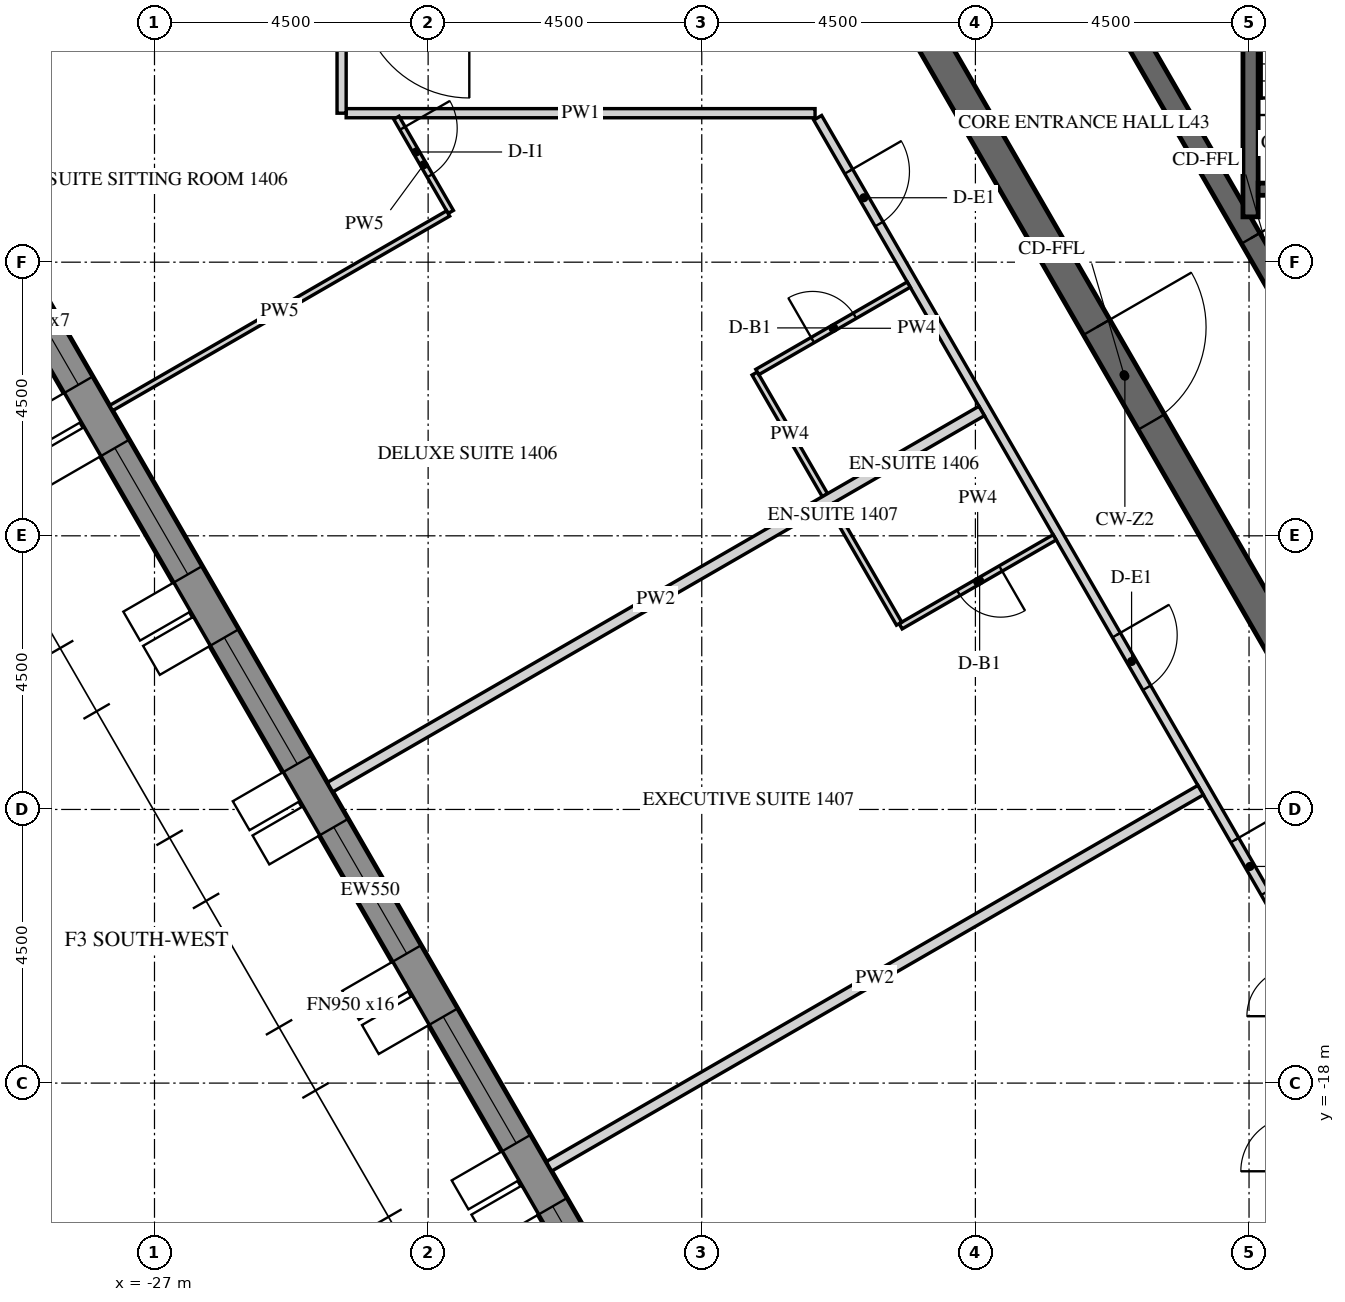
"""IFC4 building model, lengths in metres.
Left out: names, types, materials, properties, quantities, classifications, styles, units other than length and angle.
Written with IfcOpenShell. Run it as: python <this file> out.ifc"""

import sys

from ifc_helpers import new_model, si_unit, direction, frame, frame_2d, origin, place, context, subcontext, project, spatial, polyline, rectangle, outline, extrude, element, fill, save


model = new_model("IFC4")
c1 = context("Model", 3, precision=1e-05, world=origin(), true_north=direction((0.0, 1.0)))
c2 = subcontext(c1, "Body", "Model", "MODEL_VIEW")
j1 = project(units=[si_unit("LENGTHUNIT", "METRE"), si_unit("PLANEANGLEUNIT", "RADIAN")], contexts=[c1])
p1 = place(None, origin())
s1 = spatial("IfcSite", under=j1, at=p1, CompositionType="ELEMENT")
p2 = place(p1, origin())
s2 = spatial("IfcBuilding", under=s1, at=p2, CompositionType="ELEMENT")
p3 = place(p2, frame((0.0, 0.0, 183.9)))
s3 = spatial("IfcBuildingStorey", under=s2, at=p3, CompositionType="ELEMENT", Elevation=183.9)
p4 = place(p3, frame((-30.391, -2.811, -0.15), z_axis=(0.0, 0.0, 1.0), x_axis=(0.499998569178, -0.866026229868, 0.0)))
e1 = element("IfcWall", 1, at=p4, inside=s3, PredefinedType="SOLIDWALL", context=c2, shape_type="SweptSolid", body=[
    extrude(outline(polyline([(-0.022, -0.275), (27.783, -0.275), (27.732, 0.275), (0.022, 0.275), (-0.022, -0.275)])), origin(), (0.0, 0.0, 1.0), 3.9),
])
p5 = place(p4, frame((1.879, 0.0, 1.05)))
e2 = element("IfcOpeningElement", 2, at=p5, cuts=e1, PredefinedType="OPENING", context=c2, shape_type="SweptSolid", body=[
    extrude(rectangle(XDim=2.4, YDim=2.4, at=frame_2d((1.2, 1.2))), frame((0.0, 0.285, 0.0), z_axis=(0.0, -1.0, 0.0), x_axis=(1.0, 0.0, 0.0)), (0.0, 0.0, 1.0), 0.57),
])
p6 = place(p4, frame((5.479, 0.0, 1.05)))
e3 = element("IfcOpeningElement", 3, at=p6, cuts=e1, PredefinedType="OPENING", context=c2, shape_type="SweptSolid", body=[
    extrude(rectangle(XDim=2.4, YDim=2.4, at=frame_2d((1.2, 1.2))), frame((0.0, 0.285, 0.0), z_axis=(0.0, -1.0, 0.0), x_axis=(1.0, 0.0, 0.0)), (0.0, 0.0, 1.0), 0.57),
])
p7 = place(p4, frame((9.079, 0.0, 1.05)))
e4 = element("IfcOpeningElement", 4, at=p7, cuts=e1, PredefinedType="OPENING", context=c2, shape_type="SweptSolid", body=[
    extrude(rectangle(XDim=2.4, YDim=2.4, at=frame_2d((1.2, 1.2))), frame((0.0, 0.285, 0.0), z_axis=(0.0, -1.0, 0.0), x_axis=(1.0, 0.0, 0.0)), (0.0, 0.0, 1.0), 0.57),
])
p8 = place(p4, frame((12.679, 0.0, 1.05)))
e5 = element("IfcOpeningElement", 5, at=p8, cuts=e1, PredefinedType="OPENING", context=c2, shape_type="SweptSolid", body=[
    extrude(rectangle(XDim=2.4, YDim=2.4, at=frame_2d((1.2, 1.2))), frame((0.0, 0.285, 0.0), z_axis=(0.0, -1.0, 0.0), x_axis=(1.0, 0.0, 0.0)), (0.0, 0.0, 1.0), 0.57),
])
p9 = place(p4, frame((16.279, 0.0, 1.05)))
e6 = element("IfcOpeningElement", 6, at=p9, cuts=e1, PredefinedType="OPENING", context=c2, shape_type="SweptSolid", body=[
    extrude(rectangle(XDim=2.4, YDim=2.4, at=frame_2d((1.2, 1.2))), frame((0.0, 0.285, 0.0), z_axis=(0.0, -1.0, 0.0), x_axis=(1.0, 0.0, 0.0)), (0.0, 0.0, 1.0), 0.57),
])
p10 = place(p4, frame((19.879, 0.0, 1.05)))
e7 = element("IfcOpeningElement", 7, at=p10, cuts=e1, PredefinedType="OPENING", context=c2, shape_type="SweptSolid", body=[
    extrude(rectangle(XDim=2.4, YDim=2.4, at=frame_2d((1.2, 1.2))), frame((0.0, 0.285, 0.0), z_axis=(0.0, -1.0, 0.0), x_axis=(1.0, 0.0, 0.0)), (0.0, 0.0, 1.0), 0.57),
])
p11 = place(p4, frame((23.479, 0.0, 1.05)))
e8 = element("IfcOpeningElement", 8, at=p11, cuts=e1, PredefinedType="OPENING", context=c2, shape_type="SweptSolid", body=[
    extrude(rectangle(XDim=2.4, YDim=2.4, at=frame_2d((1.2, 1.2))), frame((0.0, 0.285, 0.0), z_axis=(0.0, -1.0, 0.0), x_axis=(1.0, 0.0, 0.0)), (0.0, 0.0, 1.0), 0.57),
])
p12 = place(p3, frame((-14.722, 0.0, -0.15), z_axis=(0.0, 0.0, 1.0), x_axis=(0.50000571537, -0.866022103989, 0.0)))
e9 = element("IfcWall", 9, at=p12, inside=s3, PredefinedType="SHEAR", context=c2, shape_type="SweptSolid", body=[
    extrude(outline(polyline([(-0.144, -0.25), (14.867, -0.25), (14.578, 0.25), (0.144, 0.25), (-0.144, -0.25)])), origin(), (0.0, 0.0, 1.0), 3.9),
])
p13 = place(p12, frame((6.432, 0.0, 0.15)))
e10 = element("IfcOpeningElement", 10, at=p13, cuts=e9, PredefinedType="OPENING", context=c2, shape_type="SweptSolid", body=[
    extrude(rectangle(XDim=1.8, YDim=2.4, at=frame_2d((0.9, 1.2))), frame((0.0, 0.26, 0.0), z_axis=(0.0, -1.0, 0.0), x_axis=(1.0, 0.0, 0.0)), (0.0, 0.0, 1.0), 0.52),
])
p14 = place(p3, frame((-11.345, 0.0, -0.15), z_axis=(0.0, 0.0, 1.0), x_axis=(0.499995046907, -0.866028263435, 0.0)))
e11 = element("IfcWall", 11, at=p14, inside=s3, PredefinedType="SHEAR", context=c2, shape_type="SweptSolid", body=[
    extrude(outline(polyline([(-0.101, -0.175), (11.446, -0.175), (11.244, 0.175), (0.101, 0.175), (-0.101, -0.175)])), origin(), (0.0, 0.0, 1.0), 3.9),
])
p15 = place(p14, frame((4.744, 0.0, 0.15)))
e12 = element("IfcOpeningElement", 12, at=p15, cuts=e11, PredefinedType="OPENING", context=c2, shape_type="SweptSolid", body=[
    extrude(rectangle(XDim=1.8, YDim=2.4, at=frame_2d((0.9, 1.2))), frame((0.0, 0.185, 0.0), z_axis=(0.0, -1.0, 0.0), x_axis=(1.0, 0.0, 0.0)), (0.0, 0.0, 1.0), 0.37),
])
p16 = place(p3, frame((-8.975, -3.755, -0.25), z_axis=(0.0, 0.0, 1.0), x_axis=(0.0, 1.0, 0.0)))
e13 = element("IfcWall", 13, at=p16, inside=s3, PredefinedType="SHEAR", context=c2, shape_type="SweptSolid", body=[
    extrude(rectangle(XDim=7.51, YDim=0.25, at=frame_2d((3.755, 0.0))), origin(), (0.0, 0.0, 1.0), 3.9),
])
p17 = place(p3, frame((-8.85, -3.3, -0.25), z_axis=(0.0, 0.0, 1.0), x_axis=(1.0, 0.0, 0.0)))
e14 = element("IfcWall", 14, at=p17, inside=s3, PredefinedType="SHEAR", context=c2, shape_type="SweptSolid", body=[
    extrude(rectangle(XDim=2.95, YDim=0.2, at=frame_2d((1.475, 0.0))), origin(), (0.0, 0.0, 1.0), 3.9),
])
p18 = place(p17, frame((0.875, 0.0, 0.25)))
e15 = element("IfcOpeningElement", 15, at=p18, cuts=e14, PredefinedType="OPENING", context=c2, shape_type="SweptSolid", body=[
    extrude(rectangle(XDim=1.2, YDim=2.4, at=frame_2d((0.6, 1.2))), frame((0.0, 0.11, 0.0), z_axis=(0.0, -1.0, 0.0), x_axis=(1.0, 0.0, 0.0)), (0.0, 0.0, 1.0), 0.22),
])
p19 = place(p3, frame((-23.848, -2.05, 0.0), z_axis=(0.0, 0.0, 1.0), x_axis=(1.0, 0.0, 0.0)))
e16 = element("IfcWall", 16, at=p19, inside=s3, PredefinedType="PARTITIONING", context=c2, shape_type="SweptSolid", body=[
    extrude(rectangle(XDim=7.711, YDim=0.15, at=frame_2d((3.855, 0.0))), origin(), (0.0, 0.0, 1.0), 2.988),
])
p20 = place(p3, frame((-16.094, -2.125, 0.0), z_axis=(0.0, 0.0, 1.0), x_axis=(0.500010545262, -0.866019315389, 0.0)))
e17 = element("IfcWall", 17, at=p20, inside=s3, PredefinedType="PARTITIONING", context=c2, shape_type="SweptSolid", body=[
    extrude(rectangle(XDim=14.867, YDim=0.15, at=frame_2d((7.434, 0.0))), origin(), (0.0, 0.0, 1.0), 2.988),
])
p21 = place(p20, frame((1.019, 0.0, 0.0)))
e18 = element("IfcOpeningElement", 18, at=p21, cuts=e17, PredefinedType="OPENING", context=c2, shape_type="SweptSolid", body=[
    extrude(rectangle(XDim=1.0, YDim=2.1, at=frame_2d((0.5, 1.05))), frame((0.0, 0.085, 0.0), z_axis=(0.0, -1.0, 0.0), x_axis=(1.0, 0.0, 0.0)), (0.0, 0.0, 1.0), 0.17),
])
p22 = place(p20, frame((9.824, 0.0, 0.0)))
e19 = element("IfcOpeningElement", 19, at=p22, cuts=e17, PredefinedType="OPENING", context=c2, shape_type="SweptSolid", body=[
    extrude(rectangle(XDim=1.0, YDim=2.1, at=frame_2d((0.5, 1.05))), frame((0.0, 0.085, 0.0), z_axis=(0.0, -1.0, 0.0), x_axis=(1.0, 0.0, 0.0)), (0.0, 0.0, 1.0), 0.17),
])
p23 = place(p20, frame((13.717, 0.0, 0.0)))
e20 = element("IfcOpeningElement", 20, at=p23, cuts=e17, PredefinedType="OPENING", context=c2, shape_type="SweptSolid", body=[
    extrude(rectangle(XDim=1.0, YDim=2.1, at=frame_2d((0.5, 1.05))), frame((0.0, 0.085, 0.0), z_axis=(0.0, -1.0, 0.0), x_axis=(1.0, 0.0, 0.0)), (0.0, 0.0, 1.0), 0.17),
])
p24 = place(p3, frame((-23.923, -0.564, 0.0), z_axis=(0.0, 0.0, 1.0), x_axis=(0.0, -1.0, 0.0)))
e21 = element("IfcWall", 21, at=p24, inside=s3, PredefinedType="PARTITIONING", context=c2, shape_type="SweptSolid", body=[
    extrude(rectangle(XDim=1.486, YDim=0.15, at=frame_2d((0.743, 0.0))), origin(), (0.0, 0.0, 1.0), 2.988),
])
p25 = place(p3, frame((-15.975, -8.331, 0.0), z_axis=(0.0, 0.0, 1.0), x_axis=(-0.500015210774, 0.866016621662, 0.0)))
e22 = element("IfcWall", 22, at=p25, inside=s3, PredefinedType="PARTITIONING", context=c2, shape_type="SweptSolid", body=[
    extrude(rectangle(XDim=2.31, YDim=0.1, at=frame_2d((1.155, 0.0))), origin(), (0.0, 0.0, 1.0), 2.988),
])
p26 = place(p3, frame((-17.086, -6.306, 0.0), z_axis=(0.0, 0.0, 1.0), x_axis=(0.866018712932, 0.500011588718, 0.0)))
e23 = element("IfcWall", 23, at=p26, inside=s3, PredefinedType="PARTITIONING", context=c2, shape_type="SweptSolid", body=[
    extrude(rectangle(XDim=2.875, YDim=0.1, at=frame_2d((1.438, 0.0))), origin(), (0.0, 0.0, 1.0), 2.988),
])
p27 = place(p26, frame((1.05, 0.0, 0.0)))
e24 = element("IfcOpeningElement", 24, at=p27, cuts=e23, PredefinedType="OPENING", context=c2, shape_type="SweptSolid", body=[
    extrude(rectangle(XDim=0.8, YDim=2.1, at=frame_2d((0.4, 1.05))), frame((0.0, 0.06, 0.0), z_axis=(0.0, -1.0, 0.0), x_axis=(1.0, 0.0, 0.0)), (0.0, 0.0, 1.0), 0.12),
])
p28 = place(p3, frame((-23.022, -2.125, 0.0), z_axis=(0.0, 0.0, 1.0), x_axis=(0.499927291608, -0.866067377925, 0.0)))
e25 = element("IfcWall", 25, at=p28, inside=s3, PredefinedType="PARTITIONING", context=c2, shape_type="SweptSolid", body=[
    extrude(rectangle(XDim=1.788, YDim=0.1, at=frame_2d((0.894, 0.0))), origin(), (0.0, 0.0, 1.0), 2.988),
])
p29 = place(p28, frame((0.2, 0.0, 0.0)))
e26 = element("IfcOpeningElement", 26, at=p29, cuts=e25, PredefinedType="OPENING", context=c2, shape_type="SweptSolid", body=[
    extrude(rectangle(XDim=0.9, YDim=2.1, at=frame_2d((0.45, 1.05))), frame((0.0, 0.06, 0.0), z_axis=(0.0, -1.0, 0.0), x_axis=(1.0, 0.0, 0.0)), (0.0, 0.0, 1.0), 0.12),
])
p30 = place(p3, frame((-22.171, -3.699, 0.0), z_axis=(0.0, 0.0, 1.0), x_axis=(-0.866025499775, -0.499999833739, 0.0)))
e27 = element("IfcWall", 27, at=p30, inside=s3, PredefinedType="PARTITIONING", context=c2, shape_type="SweptSolid", body=[
    extrude(rectangle(XDim=6.4, YDim=0.1, at=frame_2d((3.2, 0.0))), origin(), (0.0, 0.0, 1.0), 2.988),
])
p31 = place(p3, frame((-24.114, -13.134, 0.0), z_axis=(0.0, 0.0, 1.0), x_axis=(0.866024931941, 0.500000817256, 0.0)))
e28 = element("IfcWall", 28, at=p31, inside=s3, PredefinedType="PARTITIONING", context=c2, shape_type="SweptSolid", body=[
    extrude(rectangle(XDim=12.375, YDim=0.18, at=frame_2d((6.188, 0.0))), origin(), (0.0, 0.0, 1.0), 2.988),
])
p32 = place(p3, frame((-12.196, -9.025, 0.0), z_axis=(0.0, 0.0, 1.0), x_axis=(-0.86601045545, -0.500025890382, 0.0)))
e29 = element("IfcWall", 29, at=p32, inside=s3, PredefinedType="PARTITIONING", context=c2, shape_type="SweptSolid", body=[
    extrude(rectangle(XDim=2.925, YDim=0.1, at=frame_2d((1.462, 0.0))), origin(), (0.0, 0.0, 1.0), 2.988),
])
p33 = place(p32, frame((1.025, 0.0, 0.0)))
e30 = element("IfcOpeningElement", 30, at=p33, cuts=e29, PredefinedType="OPENING", context=c2, shape_type="SweptSolid", body=[
    extrude(rectangle(XDim=0.8, YDim=2.1, at=frame_2d((0.4, 1.05))), frame((0.0, 0.06, 0.0), z_axis=(0.0, -1.0, 0.0), x_axis=(1.0, 0.0, 0.0)), (0.0, 0.0, 1.0), 0.12),
])
p34 = place(p3, frame((-14.755, -10.444, 0.0), z_axis=(0.0, 0.0, 1.0), x_axis=(-0.4999967785, 0.866027263711, 0.0)))
e31 = element("IfcWall", 31, at=p34, inside=s3, PredefinedType="PARTITIONING", context=c2, shape_type="SweptSolid", body=[
    extrude(rectangle(XDim=2.26, YDim=0.1, at=frame_2d((1.13, 0.0))), origin(), (0.0, 0.0, 1.0), 2.988),
])
p35 = place(p3, frame((-20.513, -19.37, 0.0), z_axis=(0.0, 0.0, 1.0), x_axis=(0.866024931941, 0.500000817256, 0.0)))
e32 = element("IfcWall", 32, at=p35, inside=s3, PredefinedType="PARTITIONING", context=c2, shape_type="SweptSolid", body=[
    extrude(rectangle(XDim=12.375, YDim=0.18, at=frame_2d((6.188, 0.0))), origin(), (0.0, 0.0, 1.0), 2.988),
])
p36 = place(p5, frame((0.0, 0.205, 0.0)))
e33 = element("IfcWindow", 33, at=p36, inside=s3, PartitioningType="DOUBLE_PANEL_VERTICAL", PredefinedType="WINDOW", context=c2, shape_type="SweptSolid", body=[
    extrude(rectangle(XDim=2.4, YDim=2.4, at=frame_2d((1.2, 1.2))), frame((0.0, 0.03, 0.0), z_axis=(0.0, -1.0, 0.0), x_axis=(1.0, 0.0, 0.0)), (0.0, 0.0, 1.0), 0.06),
])
fill(e2, e33)
p37 = place(p6, frame((0.0, 0.205, 0.0)))
e34 = element("IfcWindow", 34, at=p37, inside=s3, PartitioningType="DOUBLE_PANEL_VERTICAL", PredefinedType="WINDOW", context=c2, shape_type="SweptSolid", body=[
    extrude(rectangle(XDim=2.4, YDim=2.4, at=frame_2d((1.2, 1.2))), frame((0.0, 0.03, 0.0), z_axis=(0.0, -1.0, 0.0), x_axis=(1.0, 0.0, 0.0)), (0.0, 0.0, 1.0), 0.06),
])
fill(e3, e34)
p38 = place(p7, frame((0.0, 0.205, 0.0)))
e35 = element("IfcWindow", 35, at=p38, inside=s3, PartitioningType="DOUBLE_PANEL_VERTICAL", PredefinedType="WINDOW", context=c2, shape_type="SweptSolid", body=[
    extrude(rectangle(XDim=2.4, YDim=2.4, at=frame_2d((1.2, 1.2))), frame((0.0, 0.03, 0.0), z_axis=(0.0, -1.0, 0.0), x_axis=(1.0, 0.0, 0.0)), (0.0, 0.0, 1.0), 0.06),
])
fill(e4, e35)
p39 = place(p8, frame((0.0, 0.205, 0.0)))
e36 = element("IfcWindow", 36, at=p39, inside=s3, PartitioningType="DOUBLE_PANEL_VERTICAL", PredefinedType="WINDOW", context=c2, shape_type="SweptSolid", body=[
    extrude(rectangle(XDim=2.4, YDim=2.4, at=frame_2d((1.2, 1.2))), frame((0.0, 0.03, 0.0), z_axis=(0.0, -1.0, 0.0), x_axis=(1.0, 0.0, 0.0)), (0.0, 0.0, 1.0), 0.06),
])
fill(e5, e36)
p40 = place(p9, frame((0.0, 0.205, 0.0)))
e37 = element("IfcWindow", 37, at=p40, inside=s3, PartitioningType="DOUBLE_PANEL_VERTICAL", PredefinedType="WINDOW", context=c2, shape_type="SweptSolid", body=[
    extrude(rectangle(XDim=2.4, YDim=2.4, at=frame_2d((1.2, 1.2))), frame((0.0, 0.03, 0.0), z_axis=(0.0, -1.0, 0.0), x_axis=(1.0, 0.0, 0.0)), (0.0, 0.0, 1.0), 0.06),
])
fill(e6, e37)
p41 = place(p10, frame((0.0, 0.205, 0.0)))
e38 = element("IfcWindow", 38, at=p41, inside=s3, PartitioningType="DOUBLE_PANEL_VERTICAL", PredefinedType="WINDOW", context=c2, shape_type="SweptSolid", body=[
    extrude(rectangle(XDim=2.4, YDim=2.4, at=frame_2d((1.2, 1.2))), frame((0.0, 0.03, 0.0), z_axis=(0.0, -1.0, 0.0), x_axis=(1.0, 0.0, 0.0)), (0.0, 0.0, 1.0), 0.06),
])
fill(e7, e38)
p42 = place(p13, origin())
e39 = element("IfcDoor", 39, at=p42, inside=s3, OperationType="DOUBLE_DOOR_SINGLE_SWING", PredefinedType="DOOR", context=c2, shape_type="SweptSolid", body=[
    extrude(rectangle(XDim=1.8, YDim=2.4, at=frame_2d((0.9, 1.2))), frame((0.0, 0.025, 0.0), z_axis=(0.0, -1.0, 0.0), x_axis=(1.0, 0.0, 0.0)), (0.0, 0.0, 1.0), 0.05),
])
fill(e10, e39)
p43 = place(p15, origin())
e40 = element("IfcDoor", 40, at=p43, inside=s3, OperationType="DOUBLE_DOOR_SINGLE_SWING", PredefinedType="DOOR", context=c2, shape_type="SweptSolid", body=[
    extrude(rectangle(XDim=1.8, YDim=2.4, at=frame_2d((0.9, 1.2))), frame((0.0, 0.025, 0.0), z_axis=(0.0, -1.0, 0.0), x_axis=(1.0, 0.0, 0.0)), (0.0, 0.0, 1.0), 0.05),
])
fill(e12, e40)
p44 = place(p21, origin())
e41 = element("IfcDoor", 41, at=p44, inside=s3, OperationType="SINGLE_SWING_RIGHT", PredefinedType="DOOR", context=c2, shape_type="SweptSolid", body=[
    extrude(rectangle(XDim=1.0, YDim=2.1, at=frame_2d((0.5, 1.05))), frame((0.0, 0.025, 0.0), z_axis=(0.0, -1.0, 0.0), x_axis=(1.0, 0.0, 0.0)), (0.0, 0.0, 1.0), 0.05),
])
fill(e18, e41)
p45 = place(p27, origin())
e42 = element("IfcDoor", 42, at=p45, inside=s3, OperationType="SINGLE_SWING_RIGHT", PredefinedType="DOOR", context=c2, shape_type="SweptSolid", body=[
    extrude(rectangle(XDim=0.8, YDim=2.1, at=frame_2d((0.4, 1.05))), frame((0.0, 0.025, 0.0), z_axis=(0.0, -1.0, 0.0), x_axis=(1.0, 0.0, 0.0)), (0.0, 0.0, 1.0), 0.05),
])
fill(e24, e42)
p46 = place(p29, origin())
e43 = element("IfcDoor", 43, at=p46, inside=s3, OperationType="SINGLE_SWING_RIGHT", PredefinedType="DOOR", context=c2, shape_type="SweptSolid", body=[
    extrude(rectangle(XDim=0.9, YDim=2.1, at=frame_2d((0.45, 1.05))), frame((0.0, 0.025, 0.0), z_axis=(0.0, -1.0, 0.0), x_axis=(1.0, 0.0, 0.0)), (0.0, 0.0, 1.0), 0.05),
])
fill(e26, e43)
p47 = place(p22, origin())
e44 = element("IfcDoor", 44, at=p47, inside=s3, OperationType="SINGLE_SWING_RIGHT", PredefinedType="DOOR", context=c2, shape_type="SweptSolid", body=[
    extrude(rectangle(XDim=1.0, YDim=2.1, at=frame_2d((0.5, 1.05))), frame((0.0, 0.025, 0.0), z_axis=(0.0, -1.0, 0.0), x_axis=(1.0, 0.0, 0.0)), (0.0, 0.0, 1.0), 0.05),
])
fill(e19, e44)
p48 = place(p33, origin())
e45 = element("IfcDoor", 45, at=p48, inside=s3, OperationType="SINGLE_SWING_RIGHT", PredefinedType="DOOR", context=c2, shape_type="SweptSolid", body=[
    extrude(rectangle(XDim=0.8, YDim=2.1, at=frame_2d((0.4, 1.05))), frame((0.0, 0.025, 0.0), z_axis=(0.0, -1.0, 0.0), x_axis=(1.0, 0.0, 0.0)), (0.0, 0.0, 1.0), 0.05),
])
fill(e30, e45)
p49 = place(p23, origin())
e46 = element("IfcDoor", 46, at=p49, inside=s3, OperationType="SINGLE_SWING_LEFT", PredefinedType="DOOR", context=c2, shape_type="SweptSolid", body=[
    extrude(rectangle(XDim=1.0, YDim=2.1, at=frame_2d((0.5, 1.05))), frame((0.0, 0.025, 0.0), z_axis=(0.0, -1.0, 0.0), x_axis=(1.0, 0.0, 0.0)), (0.0, 0.0, 1.0), 0.05),
])
fill(e20, e46)
save(model, sys.argv[1])
